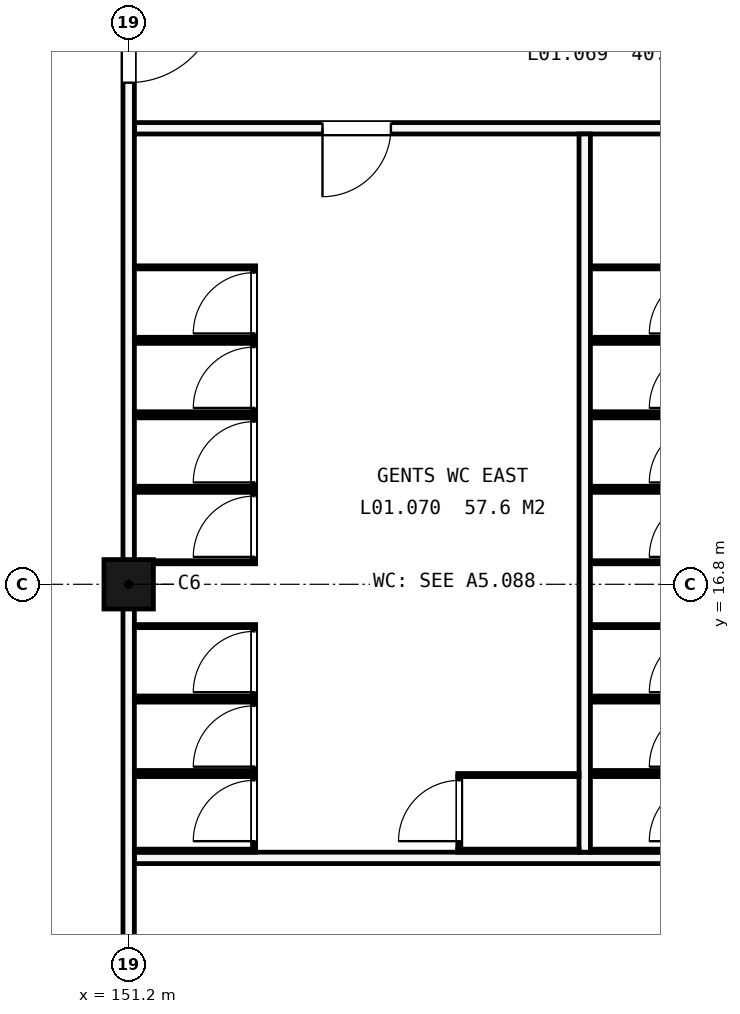
"""IFC4 building model, lengths in metres.
Left out: names, types, materials, properties, quantities, classifications, styles, units other than length and angle.
Written with IfcOpenShell. Run it as: python <this file> out.ifc"""

import sys

from ifc_helpers import new_model, si_unit, direction, frame, frame_2d, origin, origin_2d, place, context, subcontext, project, spatial, rectangle, extrude, element, fill, save


model = new_model("IFC4")
c1 = context("Model", 3, precision=1e-05, world=origin(), true_north=direction((0.0, 1.0)))
c2 = subcontext(c1, "Body", "Model", "MODEL_VIEW")
j1 = project(units=[si_unit("LENGTHUNIT", "METRE"), si_unit("PLANEANGLEUNIT", "RADIAN")], contexts=[c1])
p1 = place(None, origin())
s1 = spatial("IfcSite", under=j1, at=p1, CompositionType="ELEMENT")
p2 = place(p1, origin())
s2 = spatial("IfcBuilding", under=s1, at=p2, CompositionType="ELEMENT")
p3 = place(p2, frame((0.0, 0.0, 5.4)))
s3 = spatial("IfcBuildingStorey", under=s2, at=p3, CompositionType="ELEMENT", Elevation=5.4)
p4 = place(p3, frame((151.2, 16.8, -0.3), z_axis=(0.0, 0.0, 1.0), x_axis=(1.0, 0.0, 0.0)))
e1 = element("IfcColumn", 1, at=p4, inside=s3, PredefinedType="COLUMN", context=c2, shape_type="SweptSolid", body=[
    extrude(rectangle(XDim=0.65, YDim=0.65, at=origin_2d()), origin(), (0.0, 0.0, 1.0), 4.55),
])
p5 = place(p3, frame((151.275, 13.2, 0.0), z_axis=(0.0, 0.0, 1.0), x_axis=(1.0, 0.0, 0.0)))
e2 = element("IfcWall", 2, at=p5, inside=s3, PredefinedType="PARTITIONING", context=c2, shape_type="SweptSolid", body=[
    extrude(rectangle(XDim=16.725, YDim=0.15, at=frame_2d((8.363, 0.0))), origin(), (0.0, 0.0, 1.0), 4.2),
])
p6 = place(p5, frame((13.825, 0.0, 0.0)))
e3 = element("IfcOpeningElement", 3, at=p6, cuts=e2, PredefinedType="OPENING", context=c2, shape_type="SweptSolid", body=[
    extrude(rectangle(XDim=1.0, YDim=2.1, at=frame_2d((0.5, 1.05))), frame((0.0, 0.085, 0.0), z_axis=(0.0, -1.0, 0.0), x_axis=(1.0, 0.0, 0.0)), (0.0, 0.0, 1.0), 0.17),
])
p7 = place(p3, frame((151.275, 22.8, 0.0), z_axis=(0.0, 0.0, 1.0), x_axis=(1.0, 0.0, 0.0)))
e4 = element("IfcWall", 4, at=p7, inside=s3, PredefinedType="PARTITIONING", context=c2, shape_type="SweptSolid", body=[
    extrude(rectangle(XDim=16.575, YDim=0.15, at=frame_2d((8.288, 0.0))), origin(), (0.0, 0.0, 1.0), 4.2),
])
p8 = place(p7, frame((2.475, 0.0, 0.0)))
e5 = element("IfcOpeningElement", 5, at=p8, cuts=e4, PredefinedType="OPENING", context=c2, shape_type="SweptSolid", body=[
    extrude(rectangle(XDim=0.9, YDim=2.1, at=frame_2d((0.45, 1.05))), frame((0.0, 0.085, 0.0), z_axis=(0.0, -1.0, 0.0), x_axis=(1.0, 0.0, 0.0)), (0.0, 0.0, 1.0), 0.17),
])
p9 = place(p7, frame((8.475, 0.0, 0.0)))
e6 = element("IfcOpeningElement", 6, at=p9, cuts=e4, PredefinedType="OPENING", context=c2, shape_type="SweptSolid", body=[
    extrude(rectangle(XDim=0.9, YDim=2.1, at=frame_2d((0.45, 1.05))), frame((0.0, 0.085, 0.0), z_axis=(0.0, -1.0, 0.0), x_axis=(1.0, 0.0, 0.0)), (0.0, 0.0, 1.0), 0.17),
])
p10 = place(p7, frame((13.8, 0.0, 0.0)))
e7 = element("IfcOpeningElement", 7, at=p10, cuts=e4, PredefinedType="OPENING", context=c2, shape_type="SweptSolid", body=[
    extrude(rectangle(XDim=1.05, YDim=2.25, at=frame_2d((0.525, 1.125))), frame((0.0, 0.085, 0.0), z_axis=(0.0, -1.0, 0.0), x_axis=(1.0, 0.0, 0.0)), (0.0, 0.0, 1.0), 0.17),
])
p11 = place(p3, frame((151.2, 8.475, 0.0), z_axis=(0.0, 0.0, 1.0), x_axis=(0.0, 1.0, 0.0)))
e8 = element("IfcWall", 8, at=p11, inside=s3, PredefinedType="PARTITIONING", context=c2, shape_type="SweptSolid", body=[
    extrude(rectangle(XDim=16.65, YDim=0.15, at=frame_2d((8.325, 0.0))), origin(), (0.0, 0.0, 1.0), 3.5),
])
p12 = place(p11, frame((14.925, 0.0, 0.0)))
e9 = element("IfcOpeningElement", 9, at=p12, cuts=e8, PredefinedType="OPENING", context=c2, shape_type="SweptSolid", body=[
    extrude(rectangle(XDim=1.2, YDim=2.1, at=frame_2d((0.6, 1.05))), frame((0.0, 0.085, 0.0), z_axis=(0.0, -1.0, 0.0), x_axis=(1.0, 0.0, 0.0)), (0.0, 0.0, 1.0), 0.17),
])
p13 = place(p3, frame((157.2, 13.275, 0.0), z_axis=(0.0, 0.0, 1.0), x_axis=(0.0, 1.0, 0.0)))
e10 = element("IfcWall", 10, at=p13, inside=s3, PredefinedType="PARTITIONING", context=c2, shape_type="SweptSolid", body=[
    extrude(rectangle(XDim=9.45, YDim=0.15, at=frame_2d((4.725, 0.0))), origin(), (0.0, 0.0, 1.0), 4.2),
])
for number, where, z_axis, x_axis in (
    (11, (151.275, 13.295, 0.0), (0.0, 0.0, 1.0), (1.0, 0.0, 0.0)),
    (12, (151.275, 14.29, 0.0), (0.0, 0.0, 1.0), (1.0, 0.0, 0.0)),
):
    element("IfcWall", number, at=place(p3, frame(where, z_axis=z_axis, x_axis=x_axis)), inside=s3, PredefinedType="PARTITIONING", context=c2, shape_type="SweptSolid", body=[
        extrude(rectangle(XDim=1.595, YDim=0.04, at=frame_2d((0.798, 0.0))), origin(), (0.0, 0.0, 1.0), 2.0),
    ])
p14 = place(p3, frame((152.85, 13.315, 0.0), z_axis=(0.0, 0.0, 1.0), x_axis=(0.0, 1.0, 0.0)))
e13 = element("IfcWall", 13, at=p14, inside=s3, PredefinedType="PARTITIONING", context=c2, shape_type="SweptSolid", body=[
    extrude(rectangle(XDim=0.955, YDim=0.04, at=frame_2d((0.478, 0.0))), origin(), (0.0, 0.0, 1.0), 2.0),
])
p15 = place(p14, frame((0.105, 0.0, 0.0)))
e14 = element("IfcOpeningElement", 14, at=p15, cuts=e13, PredefinedType="OPENING", context=c2, shape_type="SweptSolid", body=[
    extrude(rectangle(XDim=0.8, YDim=2.0, at=frame_2d((0.4, 1.0))), frame((0.0, 0.03, 0.0), z_axis=(0.0, -1.0, 0.0), x_axis=(1.0, 0.0, 0.0)), (0.0, 0.0, 1.0), 0.06),
])
for number, where, z_axis, x_axis in (
    (15, (151.275, 14.33, 0.0), (0.0, 0.0, 1.0), (1.0, 0.0, 0.0)),
    (16, (151.275, 15.27, 0.0), (0.0, 0.0, 1.0), (1.0, 0.0, 0.0)),
):
    element("IfcWall", number, at=place(p3, frame(where, z_axis=z_axis, x_axis=x_axis)), inside=s3, PredefinedType="PARTITIONING", context=c2, shape_type="SweptSolid", body=[
        extrude(rectangle(XDim=1.595, YDim=0.04, at=frame_2d((0.798, 0.0))), origin(), (0.0, 0.0, 1.0), 2.0),
    ])
p16 = place(p3, frame((152.85, 14.35, 0.0), z_axis=(0.0, 0.0, 1.0), x_axis=(0.0, 1.0, 0.0)))
e17 = element("IfcWall", 17, at=p16, inside=s3, PredefinedType="PARTITIONING", context=c2, shape_type="SweptSolid", body=[
    extrude(rectangle(XDim=0.9, YDim=0.04, at=frame_2d((0.45, 0.0))), origin(), (0.0, 0.0, 1.0), 2.0),
])
p17 = place(p16, frame((0.05, 0.0, 0.0)))
e18 = element("IfcOpeningElement", 18, at=p17, cuts=e17, PredefinedType="OPENING", context=c2, shape_type="SweptSolid", body=[
    extrude(rectangle(XDim=0.8, YDim=2.0, at=frame_2d((0.4, 1.0))), frame((0.0, 0.03, 0.0), z_axis=(0.0, -1.0, 0.0), x_axis=(1.0, 0.0, 0.0)), (0.0, 0.0, 1.0), 0.06),
])
for number, where, z_axis, x_axis in (
    (19, (151.275, 15.31, 0.0), (0.0, 0.0, 1.0), (1.0, 0.0, 0.0)),
    (20, (151.275, 16.25, 0.0), (0.0, 0.0, 1.0), (1.0, 0.0, 0.0)),
):
    element("IfcWall", number, at=place(p3, frame(where, z_axis=z_axis, x_axis=x_axis)), inside=s3, PredefinedType="PARTITIONING", context=c2, shape_type="SweptSolid", body=[
        extrude(rectangle(XDim=1.595, YDim=0.04, at=frame_2d((0.798, 0.0))), origin(), (0.0, 0.0, 1.0), 2.0),
    ])
p18 = place(p3, frame((152.85, 15.33, 0.0), z_axis=(0.0, 0.0, 1.0), x_axis=(0.0, 1.0, 0.0)))
e21 = element("IfcWall", 21, at=p18, inside=s3, PredefinedType="PARTITIONING", context=c2, shape_type="SweptSolid", body=[
    extrude(rectangle(XDim=0.9, YDim=0.04, at=frame_2d((0.45, 0.0))), origin(), (0.0, 0.0, 1.0), 2.0),
])
p19 = place(p18, frame((0.05, 0.0, 0.0)))
e22 = element("IfcOpeningElement", 22, at=p19, cuts=e21, PredefinedType="OPENING", context=c2, shape_type="SweptSolid", body=[
    extrude(rectangle(XDim=0.8, YDim=2.0, at=frame_2d((0.4, 1.0))), frame((0.0, 0.03, 0.0), z_axis=(0.0, -1.0, 0.0), x_axis=(1.0, 0.0, 0.0)), (0.0, 0.0, 1.0), 0.06),
])
for number, where, z_axis, x_axis in (
    (23, (151.275, 17.09, 0.0), (0.0, 0.0, 1.0), (1.0, 0.0, 0.0)),
    (24, (151.275, 18.03, 0.0), (0.0, 0.0, 1.0), (1.0, 0.0, 0.0)),
):
    element("IfcWall", number, at=place(p3, frame(where, z_axis=z_axis, x_axis=x_axis)), inside=s3, PredefinedType="PARTITIONING", context=c2, shape_type="SweptSolid", body=[
        extrude(rectangle(XDim=1.595, YDim=0.04, at=frame_2d((0.798, 0.0))), origin(), (0.0, 0.0, 1.0), 2.0),
    ])
p20 = place(p3, frame((152.85, 17.11, 0.0), z_axis=(0.0, 0.0, 1.0), x_axis=(0.0, 1.0, 0.0)))
e25 = element("IfcWall", 25, at=p20, inside=s3, PredefinedType="PARTITIONING", context=c2, shape_type="SweptSolid", body=[
    extrude(rectangle(XDim=0.9, YDim=0.04, at=frame_2d((0.45, 0.0))), origin(), (0.0, 0.0, 1.0), 2.0),
])
p21 = place(p20, frame((0.05, 0.0, 0.0)))
e26 = element("IfcOpeningElement", 26, at=p21, cuts=e25, PredefinedType="OPENING", context=c2, shape_type="SweptSolid", body=[
    extrude(rectangle(XDim=0.8, YDim=2.0, at=frame_2d((0.4, 1.0))), frame((0.0, 0.03, 0.0), z_axis=(0.0, -1.0, 0.0), x_axis=(1.0, 0.0, 0.0)), (0.0, 0.0, 1.0), 0.06),
])
for number, where, z_axis, x_axis in (
    (27, (151.275, 18.07, 0.0), (0.0, 0.0, 1.0), (1.0, 0.0, 0.0)),
    (28, (151.275, 19.01, 0.0), (0.0, 0.0, 1.0), (1.0, 0.0, 0.0)),
):
    element("IfcWall", number, at=place(p3, frame(where, z_axis=z_axis, x_axis=x_axis)), inside=s3, PredefinedType="PARTITIONING", context=c2, shape_type="SweptSolid", body=[
        extrude(rectangle(XDim=1.595, YDim=0.04, at=frame_2d((0.798, 0.0))), origin(), (0.0, 0.0, 1.0), 2.0),
    ])
p22 = place(p3, frame((152.85, 18.09, 0.0), z_axis=(0.0, 0.0, 1.0), x_axis=(0.0, 1.0, 0.0)))
e29 = element("IfcWall", 29, at=p22, inside=s3, PredefinedType="PARTITIONING", context=c2, shape_type="SweptSolid", body=[
    extrude(rectangle(XDim=0.9, YDim=0.04, at=frame_2d((0.45, 0.0))), origin(), (0.0, 0.0, 1.0), 2.0),
])
p23 = place(p22, frame((0.05, 0.0, 0.0)))
e30 = element("IfcOpeningElement", 30, at=p23, cuts=e29, PredefinedType="OPENING", context=c2, shape_type="SweptSolid", body=[
    extrude(rectangle(XDim=0.8, YDim=2.0, at=frame_2d((0.4, 1.0))), frame((0.0, 0.03, 0.0), z_axis=(0.0, -1.0, 0.0), x_axis=(1.0, 0.0, 0.0)), (0.0, 0.0, 1.0), 0.06),
])
for number, where, z_axis, x_axis in (
    (31, (151.275, 19.05, 0.0), (0.0, 0.0, 1.0), (1.0, 0.0, 0.0)),
    (32, (151.275, 19.99, 0.0), (0.0, 0.0, 1.0), (1.0, 0.0, 0.0)),
):
    element("IfcWall", number, at=place(p3, frame(where, z_axis=z_axis, x_axis=x_axis)), inside=s3, PredefinedType="PARTITIONING", context=c2, shape_type="SweptSolid", body=[
        extrude(rectangle(XDim=1.595, YDim=0.04, at=frame_2d((0.798, 0.0))), origin(), (0.0, 0.0, 1.0), 2.0),
    ])
p24 = place(p3, frame((152.85, 19.07, 0.0), z_axis=(0.0, 0.0, 1.0), x_axis=(0.0, 1.0, 0.0)))
e33 = element("IfcWall", 33, at=p24, inside=s3, PredefinedType="PARTITIONING", context=c2, shape_type="SweptSolid", body=[
    extrude(rectangle(XDim=0.9, YDim=0.04, at=frame_2d((0.45, 0.0))), origin(), (0.0, 0.0, 1.0), 2.0),
])
p25 = place(p24, frame((0.05, 0.0, 0.0)))
e34 = element("IfcOpeningElement", 34, at=p25, cuts=e33, PredefinedType="OPENING", context=c2, shape_type="SweptSolid", body=[
    extrude(rectangle(XDim=0.8, YDim=2.0, at=frame_2d((0.4, 1.0))), frame((0.0, 0.03, 0.0), z_axis=(0.0, -1.0, 0.0), x_axis=(1.0, 0.0, 0.0)), (0.0, 0.0, 1.0), 0.06),
])
for number, where, z_axis, x_axis in (
    (35, (151.275, 20.03, 0.0), (0.0, 0.0, 1.0), (1.0, 0.0, 0.0)),
    (36, (151.275, 20.97, 0.0), (0.0, 0.0, 1.0), (1.0, 0.0, 0.0)),
):
    element("IfcWall", number, at=place(p3, frame(where, z_axis=z_axis, x_axis=x_axis)), inside=s3, PredefinedType="PARTITIONING", context=c2, shape_type="SweptSolid", body=[
        extrude(rectangle(XDim=1.595, YDim=0.04, at=frame_2d((0.798, 0.0))), origin(), (0.0, 0.0, 1.0), 2.0),
    ])
p26 = place(p3, frame((152.85, 20.05, 0.0), z_axis=(0.0, 0.0, 1.0), x_axis=(0.0, 1.0, 0.0)))
e37 = element("IfcWall", 37, at=p26, inside=s3, PredefinedType="PARTITIONING", context=c2, shape_type="SweptSolid", body=[
    extrude(rectangle(XDim=0.9, YDim=0.04, at=frame_2d((0.45, 0.0))), origin(), (0.0, 0.0, 1.0), 2.0),
])
p27 = place(p26, frame((0.05, 0.0, 0.0)))
e38 = element("IfcOpeningElement", 38, at=p27, cuts=e37, PredefinedType="OPENING", context=c2, shape_type="SweptSolid", body=[
    extrude(rectangle(XDim=0.8, YDim=2.0, at=frame_2d((0.4, 1.0))), frame((0.0, 0.03, 0.0), z_axis=(0.0, -1.0, 0.0), x_axis=(1.0, 0.0, 0.0)), (0.0, 0.0, 1.0), 0.06),
])
for number, where, z_axis, x_axis in (
    (39, (157.125, 13.295, 0.0), (0.0, 0.0, 1.0), (-1.0, 0.0, 0.0)),
    (40, (157.125, 14.29, 0.0), (0.0, 0.0, 1.0), (-1.0, 0.0, 0.0)),
):
    element("IfcWall", number, at=place(p3, frame(where, z_axis=z_axis, x_axis=x_axis)), inside=s3, PredefinedType="PARTITIONING", context=c2, shape_type="SweptSolid", body=[
        extrude(rectangle(XDim=1.595, YDim=0.04, at=frame_2d((0.797, 0.0))), origin(), (0.0, 0.0, 1.0), 2.0),
    ])
p28 = place(p3, frame((155.55, 13.315, 0.0), z_axis=(0.0, 0.0, 1.0), x_axis=(0.0, 1.0, 0.0)))
e41 = element("IfcWall", 41, at=p28, inside=s3, PredefinedType="PARTITIONING", context=c2, shape_type="SweptSolid", body=[
    extrude(rectangle(XDim=0.955, YDim=0.04, at=frame_2d((0.478, 0.0))), origin(), (0.0, 0.0, 1.0), 2.0),
])
p29 = place(p28, frame((0.105, 0.0, 0.0)))
e42 = element("IfcOpeningElement", 42, at=p29, cuts=e41, PredefinedType="OPENING", context=c2, shape_type="SweptSolid", body=[
    extrude(rectangle(XDim=0.8, YDim=2.0, at=frame_2d((0.4, 1.0))), frame((0.0, 0.03, 0.0), z_axis=(0.0, -1.0, 0.0), x_axis=(1.0, 0.0, 0.0)), (0.0, 0.0, 1.0), 0.06),
])
for number, where, z_axis, x_axis in (
    (43, (157.275, 13.295, 0.0), (0.0, 0.0, 1.0), (1.0, 0.0, 0.0)),
    (44, (157.275, 14.29, 0.0), (0.0, 0.0, 1.0), (1.0, 0.0, 0.0)),
    (45, (157.275, 14.33, 0.0), (0.0, 0.0, 1.0), (1.0, 0.0, 0.0)),
    (46, (157.275, 15.27, 0.0), (0.0, 0.0, 1.0), (1.0, 0.0, 0.0)),
    (47, (157.275, 15.31, 0.0), (0.0, 0.0, 1.0), (1.0, 0.0, 0.0)),
    (48, (157.275, 16.25, 0.0), (0.0, 0.0, 1.0), (1.0, 0.0, 0.0)),
    (49, (157.275, 17.09, 0.0), (0.0, 0.0, 1.0), (1.0, 0.0, 0.0)),
    (50, (157.275, 18.03, 0.0), (0.0, 0.0, 1.0), (1.0, 0.0, 0.0)),
    (51, (157.275, 18.07, 0.0), (0.0, 0.0, 1.0), (1.0, 0.0, 0.0)),
    (52, (157.275, 19.01, 0.0), (0.0, 0.0, 1.0), (1.0, 0.0, 0.0)),
    (53, (157.275, 19.05, 0.0), (0.0, 0.0, 1.0), (1.0, 0.0, 0.0)),
    (54, (157.275, 19.99, 0.0), (0.0, 0.0, 1.0), (1.0, 0.0, 0.0)),
    (55, (157.275, 20.03, 0.0), (0.0, 0.0, 1.0), (1.0, 0.0, 0.0)),
    (56, (157.275, 20.97, 0.0), (0.0, 0.0, 1.0), (1.0, 0.0, 0.0)),
):
    element("IfcWall", number, at=place(p3, frame(where, z_axis=z_axis, x_axis=x_axis)), inside=s3, PredefinedType="PARTITIONING", context=c2, shape_type="SweptSolid", body=[
        extrude(rectangle(XDim=1.595, YDim=0.04, at=frame_2d((0.798, 0.0))), origin(), (0.0, 0.0, 1.0), 2.0),
    ])
p30 = place(p12, origin())
e57 = element("IfcDoor", 57, at=p30, inside=s3, OperationType="SINGLE_SWING_RIGHT", PredefinedType="DOOR", context=c2, shape_type="SweptSolid", body=[
    extrude(rectangle(XDim=1.2, YDim=2.1, at=frame_2d((0.6, 1.05))), frame((0.0, 0.025, 0.0), z_axis=(0.0, -1.0, 0.0), x_axis=(1.0, 0.0, 0.0)), (0.0, 0.0, 1.0), 0.05),
])
fill(e9, e57)
p31 = place(p8, origin())
e58 = element("IfcDoor", 58, at=p31, inside=s3, OperationType="SINGLE_SWING_LEFT", PredefinedType="DOOR", context=c2, shape_type="SweptSolid", body=[
    extrude(rectangle(XDim=0.9, YDim=2.1, at=frame_2d((0.45, 1.05))), frame((0.0, 0.025, 0.0), z_axis=(0.0, -1.0, 0.0), x_axis=(1.0, 0.0, 0.0)), (0.0, 0.0, 1.0), 0.05),
])
fill(e5, e58)
p32 = place(p15, origin())
e59 = element("IfcDoor", 59, at=p32, inside=s3, OperationType="SINGLE_SWING_LEFT", PredefinedType="DOOR", context=c2, shape_type="SweptSolid", body=[
    extrude(rectangle(XDim=0.8, YDim=2.0, at=frame_2d((0.4, 1.0))), frame((0.0, 0.02, 0.0), z_axis=(0.0, -1.0, 0.0), x_axis=(1.0, 0.0, 0.0)), (0.0, 0.0, 1.0), 0.04),
])
fill(e14, e59)
p33 = place(p17, origin())
e60 = element("IfcDoor", 60, at=p33, inside=s3, OperationType="SINGLE_SWING_LEFT", PredefinedType="DOOR", context=c2, shape_type="SweptSolid", body=[
    extrude(rectangle(XDim=0.8, YDim=2.0, at=frame_2d((0.4, 1.0))), frame((0.0, 0.02, 0.0), z_axis=(0.0, -1.0, 0.0), x_axis=(1.0, 0.0, 0.0)), (0.0, 0.0, 1.0), 0.04),
])
fill(e18, e60)
p34 = place(p19, origin())
e61 = element("IfcDoor", 61, at=p34, inside=s3, OperationType="SINGLE_SWING_LEFT", PredefinedType="DOOR", context=c2, shape_type="SweptSolid", body=[
    extrude(rectangle(XDim=0.8, YDim=2.0, at=frame_2d((0.4, 1.0))), frame((0.0, 0.02, 0.0), z_axis=(0.0, -1.0, 0.0), x_axis=(1.0, 0.0, 0.0)), (0.0, 0.0, 1.0), 0.04),
])
fill(e22, e61)
p35 = place(p21, origin())
e62 = element("IfcDoor", 62, at=p35, inside=s3, OperationType="SINGLE_SWING_LEFT", PredefinedType="DOOR", context=c2, shape_type="SweptSolid", body=[
    extrude(rectangle(XDim=0.8, YDim=2.0, at=frame_2d((0.4, 1.0))), frame((0.0, 0.02, 0.0), z_axis=(0.0, -1.0, 0.0), x_axis=(1.0, 0.0, 0.0)), (0.0, 0.0, 1.0), 0.04),
])
fill(e26, e62)
p36 = place(p23, origin())
e63 = element("IfcDoor", 63, at=p36, inside=s3, OperationType="SINGLE_SWING_LEFT", PredefinedType="DOOR", context=c2, shape_type="SweptSolid", body=[
    extrude(rectangle(XDim=0.8, YDim=2.0, at=frame_2d((0.4, 1.0))), frame((0.0, 0.02, 0.0), z_axis=(0.0, -1.0, 0.0), x_axis=(1.0, 0.0, 0.0)), (0.0, 0.0, 1.0), 0.04),
])
fill(e30, e63)
p37 = place(p25, origin())
e64 = element("IfcDoor", 64, at=p37, inside=s3, OperationType="SINGLE_SWING_LEFT", PredefinedType="DOOR", context=c2, shape_type="SweptSolid", body=[
    extrude(rectangle(XDim=0.8, YDim=2.0, at=frame_2d((0.4, 1.0))), frame((0.0, 0.02, 0.0), z_axis=(0.0, -1.0, 0.0), x_axis=(1.0, 0.0, 0.0)), (0.0, 0.0, 1.0), 0.04),
])
fill(e34, e64)
p38 = place(p27, origin())
e65 = element("IfcDoor", 65, at=p38, inside=s3, OperationType="SINGLE_SWING_LEFT", PredefinedType="DOOR", context=c2, shape_type="SweptSolid", body=[
    extrude(rectangle(XDim=0.8, YDim=2.0, at=frame_2d((0.4, 1.0))), frame((0.0, 0.02, 0.0), z_axis=(0.0, -1.0, 0.0), x_axis=(1.0, 0.0, 0.0)), (0.0, 0.0, 1.0), 0.04),
])
fill(e38, e65)
p39 = place(p29, origin())
e66 = element("IfcDoor", 66, at=p39, inside=s3, OperationType="SINGLE_SWING_LEFT", PredefinedType="DOOR", context=c2, shape_type="SweptSolid", body=[
    extrude(rectangle(XDim=0.8, YDim=2.0, at=frame_2d((0.4, 1.0))), frame((0.0, 0.02, 0.0), z_axis=(0.0, -1.0, 0.0), x_axis=(1.0, 0.0, 0.0)), (0.0, 0.0, 1.0), 0.04),
])
fill(e42, e66)
save(model, sys.argv[1])
